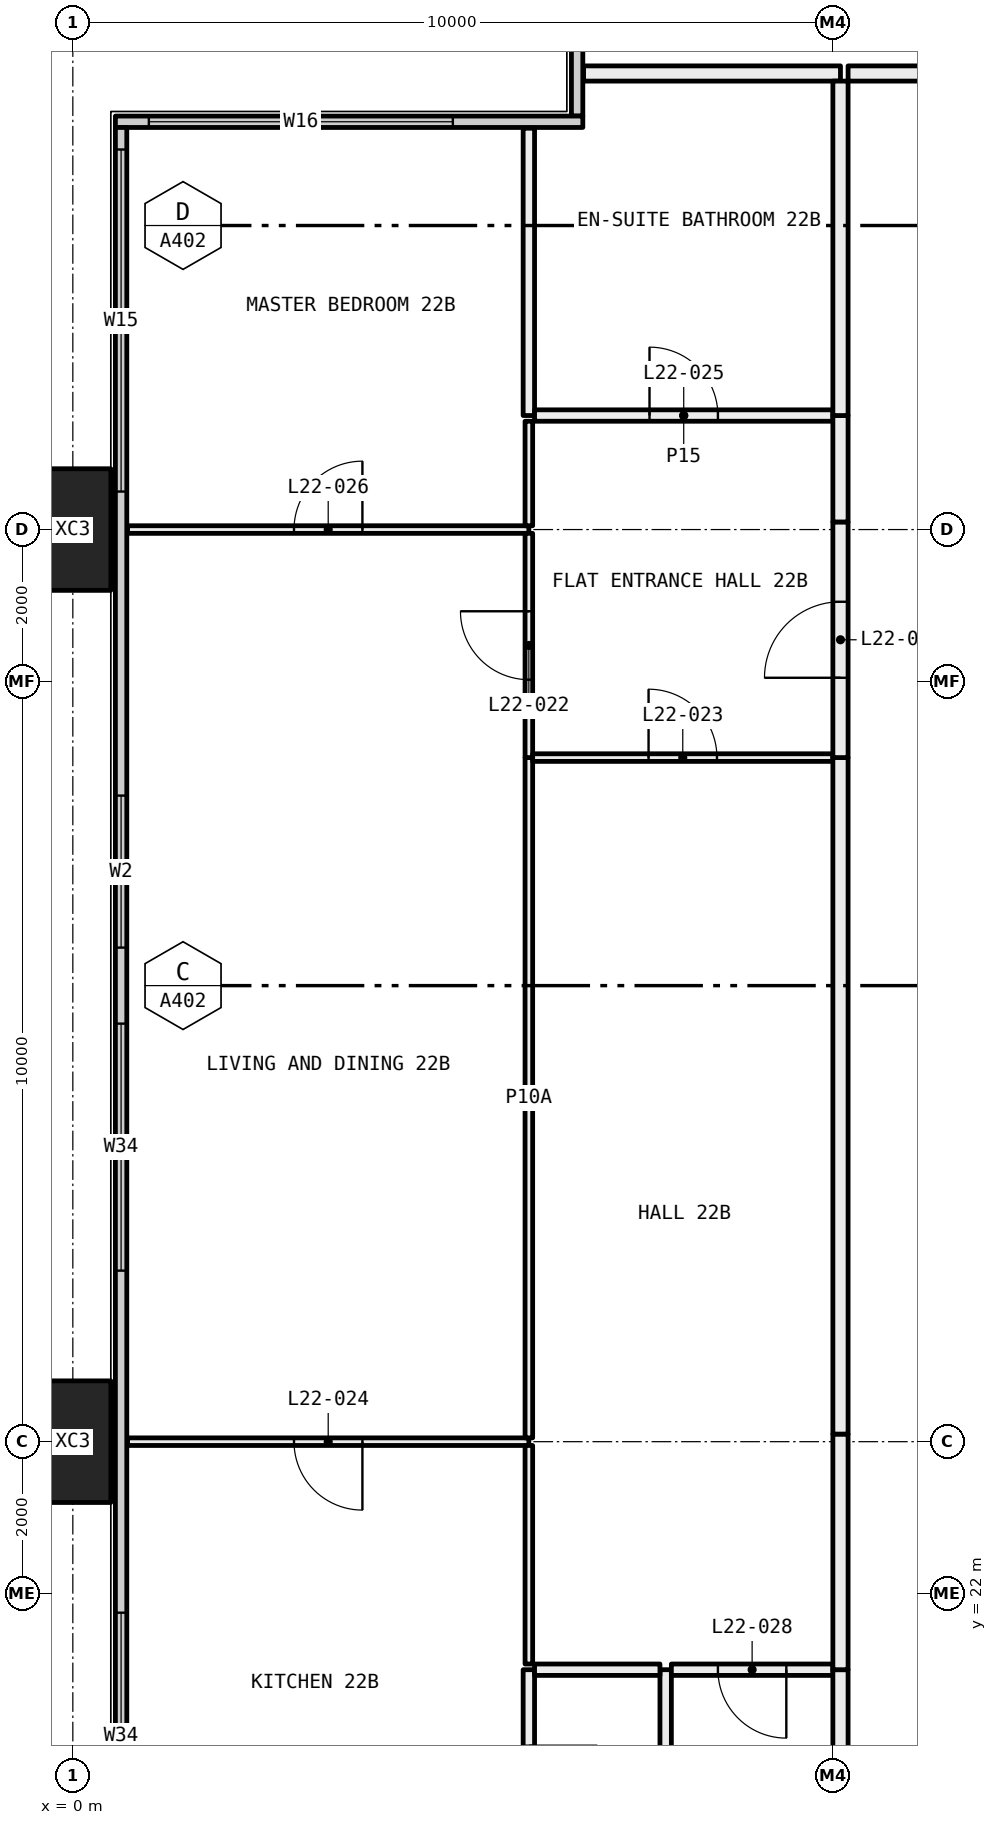
"""IFC4 building model, lengths in metres.
Left out: names, types, materials, properties, quantities, classifications, styles, units other than length and angle.
Written with IfcOpenShell. Run it as: python <this file> out.ifc"""

import sys

from ifc_helpers import new_model, si_unit, direction, frame, frame_2d, origin, origin_2d, place, context, subcontext, project, spatial, rectangle, hollow_rectangle, extrude, element, fill, save


model = new_model("IFC4")
c1 = context("Model", 3, precision=1e-05, world=origin(), true_north=direction((0.0, 1.0)))
c2 = subcontext(c1, "Body", "Model", "MODEL_VIEW")
j1 = project(units=[si_unit("LENGTHUNIT", "METRE"), si_unit("PLANEANGLEUNIT", "RADIAN")], contexts=[c1])
p1 = place(None, origin())
s1 = spatial("IfcSite", under=j1, at=p1, CompositionType="ELEMENT")
p2 = place(p1, origin())
s2 = spatial("IfcBuilding", under=s1, at=p2, CompositionType="ELEMENT")
p3 = place(p2, frame((0.0, 0.0, 88.65)))
s3 = spatial("IfcBuildingStorey", under=s2, at=p3, CompositionType="ELEMENT", Elevation=88.65)
for number, where, z_axis, x_axis in (
    (1, (0.0, 24.0, -0.4), (0.0, 0.0, 1.0), (0.0, 1.0, 0.0)),
    (2, (0.0, 36.0, -0.4), (0.0, 0.0, 1.0), (0.0, 1.0, 0.0)),
):
    element("IfcColumn", number, at=place(p3, frame(where, z_axis=z_axis, x_axis=x_axis)), inside=s3, PredefinedType="COLUMN", context=c2, shape_type="SweptSolid", body=[
        extrude(hollow_rectangle(XDim=1.6, YDim=1.0, WallThickness=0.065, at=origin_2d()), origin(), (0.0, 0.0, 1.0), 3.45),
    ])
p4 = place(p3, frame((6.635, 41.44, 0.0), z_axis=(0.0, 0.0, 1.0), x_axis=(0.0, 1.0, 0.0)))
e3 = element("IfcWall", 3, at=p4, inside=s3, PredefinedType="ELEMENTEDWALL", context=c2, shape_type="SweptSolid", body=[
    extrude(rectangle(XDim=5.85, YDim=0.15, at=frame_2d((2.925, 0.0))), origin(), (0.0, 0.0, 1.0), 3.05),
])
p5 = place(p4, frame((1.56, 0.0, 0.45)))
e4 = element("IfcOpeningElement", 4, at=p5, cuts=e3, PredefinedType="OPENING", context=c2, shape_type="SweptSolid", body=[
    extrude(rectangle(XDim=4.0, YDim=2.55, at=frame_2d((2.0, 1.275))), frame((0.0, 0.085, 0.0), z_axis=(0.0, -1.0, 0.0), x_axis=(1.0, 0.0, 0.0)), (0.0, 0.0, 1.0), 0.17),
])
p6 = place(p3, frame((0.56, 41.365, 0.0), z_axis=(0.0, 0.0, 1.0), x_axis=(1.0, 0.0, 0.0)))
e5 = element("IfcWall", 5, at=p6, inside=s3, PredefinedType="ELEMENTEDWALL", context=c2, shape_type="SweptSolid", body=[
    extrude(rectangle(XDim=6.15, YDim=0.15, at=frame_2d((3.075, 0.0))), origin(), (0.0, 0.0, 1.0), 3.05),
])
p7 = place(p6, frame((0.44, 0.0, 0.45)))
e6 = element("IfcOpeningElement", 6, at=p7, cuts=e5, PredefinedType="OPENING", context=c2, shape_type="SweptSolid", body=[
    extrude(rectangle(XDim=4.0, YDim=2.55, at=frame_2d((2.0, 1.275))), frame((0.0, 0.085, 0.0), z_axis=(0.0, -1.0, 0.0), x_axis=(1.0, 0.0, 0.0)), (0.0, 0.0, 1.0), 0.17),
])
p8 = place(p3, frame((0.635, 6.71, 0.0), z_axis=(0.0, 0.0, 1.0), x_axis=(0.0, 1.0, 0.0)))
e7 = element("IfcWall", 7, at=p8, inside=s3, PredefinedType="ELEMENTEDWALL", context=c2, shape_type="SweptSolid", body=[
    extrude(rectangle(XDim=34.58, YDim=0.15, at=frame_2d((17.29, 0.0))), origin(), (0.0, 0.0, 1.0), 3.05),
])
p9 = place(p8, frame((0.29, 0.0, 0.45)))
e8 = element("IfcOpeningElement", 8, at=p9, cuts=e7, PredefinedType="OPENING", context=c2, shape_type="SweptSolid", body=[
    extrude(rectangle(XDim=4.5, YDim=2.55, at=frame_2d((2.25, 1.275))), frame((0.0, 0.085, 0.0), z_axis=(0.0, -1.0, 0.0), x_axis=(1.0, 0.0, 0.0)), (0.0, 0.0, 1.0), 0.17),
])
p10 = place(p8, frame((7.54, 0.0, 0.45)))
e9 = element("IfcOpeningElement", 9, at=p10, cuts=e7, PredefinedType="OPENING", context=c2, shape_type="SweptSolid", body=[
    extrude(rectangle(XDim=3.25, YDim=2.55, at=frame_2d((1.625, 1.275))), frame((0.0, 0.085, 0.0), z_axis=(0.0, -1.0, 0.0), x_axis=(1.0, 0.0, 0.0)), (0.0, 0.0, 1.0), 0.17),
])
p11 = place(p8, frame((11.79, 0.0, 0.45)))
e10 = element("IfcOpeningElement", 10, at=p11, cuts=e7, PredefinedType="OPENING", context=c2, shape_type="SweptSolid", body=[
    extrude(rectangle(XDim=3.25, YDim=2.55, at=frame_2d((1.625, 1.275))), frame((0.0, 0.085, 0.0), z_axis=(0.0, -1.0, 0.0), x_axis=(1.0, 0.0, 0.0)), (0.0, 0.0, 1.0), 0.17),
])
p12 = place(p8, frame((19.54, 0.0, 0.45)))
e11 = element("IfcOpeningElement", 11, at=p12, cuts=e7, PredefinedType="OPENING", context=c2, shape_type="SweptSolid", body=[
    extrude(rectangle(XDim=3.25, YDim=2.55, at=frame_2d((1.625, 1.275))), frame((0.0, 0.085, 0.0), z_axis=(0.0, -1.0, 0.0), x_axis=(1.0, 0.0, 0.0)), (0.0, 0.0, 1.0), 0.17),
])
p13 = place(p8, frame((23.79, 0.0, 0.45)))
e12 = element("IfcOpeningElement", 12, at=p13, cuts=e7, PredefinedType="OPENING", context=c2, shape_type="SweptSolid", body=[
    extrude(rectangle(XDim=2.0, YDim=2.55, at=frame_2d((1.0, 1.275))), frame((0.0, 0.085, 0.0), z_axis=(0.0, -1.0, 0.0), x_axis=(1.0, 0.0, 0.0)), (0.0, 0.0, 1.0), 0.17),
])
p14 = place(p8, frame((29.79, 0.0, 0.45)))
e13 = element("IfcOpeningElement", 13, at=p14, cuts=e7, PredefinedType="OPENING", context=c2, shape_type="SweptSolid", body=[
    extrude(rectangle(XDim=4.5, YDim=2.55, at=frame_2d((2.25, 1.275))), frame((0.0, 0.085, 0.0), z_axis=(0.0, -1.0, 0.0), x_axis=(1.0, 0.0, 0.0)), (0.0, 0.0, 1.0), 0.17),
])
p15 = place(p3, frame((6.0, 24.0, 0.0), z_axis=(0.0, 0.0, 1.0), x_axis=(-1.0, 0.0, 0.0)))
e14 = element("IfcWall", 14, at=p15, inside=s3, PredefinedType="PARTITIONING", context=c2, shape_type="SweptSolid", body=[
    extrude(rectangle(XDim=5.28, YDim=0.1, at=frame_2d((2.64, 0.0))), origin(), (0.0, 0.0, 1.0), 2.45),
])
p16 = place(p15, frame((2.19, 0.0, 0.0)))
e15 = element("IfcOpeningElement", 15, at=p16, cuts=e14, PredefinedType="OPENING", context=c2, shape_type="SweptSolid", body=[
    extrude(rectangle(XDim=0.9, YDim=2.1, at=frame_2d((0.45, 1.05))), frame((0.0, 0.06, 0.0), z_axis=(0.0, -1.0, 0.0), x_axis=(1.0, 0.0, 0.0)), (0.0, 0.0, 1.0), 0.12),
])
p17 = place(p3, frame((6.0, 18.1, 0.0), z_axis=(0.0, 0.0, 1.0), x_axis=(0.0, 1.0, 0.0)))
e16 = element("IfcWall", 16, at=p17, inside=s3, PredefinedType="PARTITIONING", context=c2, shape_type="SweptSolid", body=[
    extrude(rectangle(XDim=2.9, YDim=0.15, at=frame_2d((1.45, 0.0))), origin(), (0.0, 0.0, 1.0), 3.05),
])
p18 = place(p17, frame((1.0, 0.0, 0.0)))
e17 = element("IfcOpeningElement", 17, at=p18, cuts=e16, PredefinedType="OPENING", context=c2, shape_type="SweptSolid", body=[
    extrude(rectangle(XDim=0.9, YDim=2.1, at=frame_2d((0.45, 1.05))), frame((0.0, 0.085, 0.0), z_axis=(0.0, -1.0, 0.0), x_axis=(1.0, 0.0, 0.0)), (0.0, 0.0, 1.0), 0.17),
])
p19 = place(p3, frame((6.0, 21.075, 0.0), z_axis=(0.0, 0.0, 1.0), x_axis=(0.0, 1.0, 0.0)))
e18 = element("IfcWall", 18, at=p19, inside=s3, PredefinedType="PARTITIONING", context=c2, shape_type="SweptSolid", body=[
    extrude(rectangle(XDim=2.875, YDim=0.1, at=frame_2d((1.438, 0.0))), origin(), (0.0, 0.0, 1.0), 2.45),
])
p20 = place(p3, frame((6.0, 36.0, 0.0), z_axis=(0.0, 0.0, 1.0), x_axis=(-1.0, 0.0, 0.0)))
e19 = element("IfcWall", 19, at=p20, inside=s3, PredefinedType="PARTITIONING", context=c2, shape_type="SweptSolid", body=[
    extrude(rectangle(XDim=5.28, YDim=0.1, at=frame_2d((2.64, 0.0))), origin(), (0.0, 0.0, 1.0), 2.45),
])
p21 = place(p20, frame((2.19, 0.0, 0.0)))
e20 = element("IfcOpeningElement", 20, at=p21, cuts=e19, PredefinedType="OPENING", context=c2, shape_type="SweptSolid", body=[
    extrude(rectangle(XDim=0.9, YDim=2.1, at=frame_2d((0.45, 1.05))), frame((0.0, 0.06, 0.0), z_axis=(0.0, -1.0, 0.0), x_axis=(1.0, 0.0, 0.0)), (0.0, 0.0, 1.0), 0.12),
])
p22 = place(p3, frame((6.0, 24.05, 0.0), z_axis=(0.0, 0.0, 1.0), x_axis=(0.0, 1.0, 0.0)))
e21 = element("IfcWall", 21, at=p22, inside=s3, PredefinedType="PARTITIONING", context=c2, shape_type="SweptSolid", body=[
    extrude(rectangle(XDim=8.95, YDim=0.1, at=frame_2d((4.475, 0.0))), origin(), (0.0, 0.0, 1.0), 2.45),
])
p23 = place(p3, frame((6.0, 33.0, 0.0), z_axis=(0.0, 0.0, 1.0), x_axis=(0.0, 1.0, 0.0)))
e22 = element("IfcWall", 22, at=p23, inside=s3, PredefinedType="PARTITIONING", context=c2, shape_type="SweptSolid", body=[
    extrude(rectangle(XDim=2.95, YDim=0.1, at=frame_2d((1.475, 0.0))), origin(), (0.0, 0.0, 1.0), 2.45),
])
p24 = place(p23, frame((1.025, 0.0, 0.0)))
e23 = element("IfcOpeningElement", 23, at=p24, cuts=e22, PredefinedType="OPENING", context=c2, shape_type="SweptSolid", body=[
    extrude(rectangle(XDim=0.9, YDim=2.1, at=frame_2d((0.45, 1.05))), frame((0.0, 0.06, 0.0), z_axis=(0.0, -1.0, 0.0), x_axis=(1.0, 0.0, 0.0)), (0.0, 0.0, 1.0), 0.12),
])
p25 = place(p3, frame((6.0, 36.05, 0.0), z_axis=(0.0, 0.0, 1.0), x_axis=(0.0, 1.0, 0.0)))
e24 = element("IfcWall", 24, at=p25, inside=s3, PredefinedType="PARTITIONING", context=c2, shape_type="SweptSolid", body=[
    extrude(rectangle(XDim=1.375, YDim=0.1, at=frame_2d((0.688, 0.0))), origin(), (0.0, 0.0, 1.0), 2.45),
])
p26 = place(p3, frame((6.0, 37.5, 0.0), z_axis=(0.0, 0.0, 1.0), x_axis=(0.0, 1.0, 0.0)))
e25 = element("IfcWall", 25, at=p26, inside=s3, PredefinedType="PARTITIONING", context=c2, shape_type="SweptSolid", body=[
    extrude(rectangle(XDim=3.78, YDim=0.15, at=frame_2d((1.89, 0.0))), origin(), (0.0, 0.0, 1.0), 3.05),
])
p27 = place(p3, frame((7.8, 18.1, 0.0), z_axis=(0.0, 0.0, 1.0), x_axis=(0.0, 1.0, 0.0)))
e26 = element("IfcWall", 26, at=p27, inside=s3, PredefinedType="PARTITIONING", context=c2, shape_type="SweptSolid", body=[
    extrude(rectangle(XDim=2.9, YDim=0.15, at=frame_2d((1.45, 0.0))), origin(), (0.0, 0.0, 1.0), 3.05),
])
p28 = place(p3, frame((7.725, 21.0, 0.0), z_axis=(0.0, 0.0, 1.0), x_axis=(-1.0, 0.0, 0.0)))
e27 = element("IfcWall", 27, at=p28, inside=s3, PredefinedType="PARTITIONING", context=c2, shape_type="SweptSolid", body=[
    extrude(rectangle(XDim=1.65, YDim=0.15, at=frame_2d((0.825, 0.0))), origin(), (0.0, 0.0, 1.0), 3.05),
])
p29 = place(p3, frame((10.0, 21.0, 0.0), z_axis=(0.0, 0.0, 1.0), x_axis=(-1.0, 0.0, 0.0)))
e28 = element("IfcWall", 28, at=p29, inside=s3, PredefinedType="PARTITIONING", context=c2, shape_type="SweptSolid", body=[
    extrude(rectangle(XDim=2.125, YDim=0.15, at=frame_2d((1.062, 0.0))), origin(), (0.0, 0.0, 1.0), 3.05),
])
p30 = place(p29, frame((0.613, 0.0, 0.0)))
e29 = element("IfcOpeningElement", 29, at=p30, cuts=e28, PredefinedType="OPENING", context=c2, shape_type="SweptSolid", body=[
    extrude(rectangle(XDim=0.9, YDim=2.1, at=frame_2d((0.45, 1.05))), frame((0.0, 0.085, 0.0), z_axis=(0.0, -1.0, 0.0), x_axis=(1.0, 0.0, 0.0)), (0.0, 0.0, 1.0), 0.17),
])
p31 = place(p3, frame((10.1, 18.1, 0.0), z_axis=(0.0, 0.0, 1.0), x_axis=(0.0, 1.0, 0.0)))
e30 = element("IfcWall", 30, at=p31, inside=s3, PredefinedType="PARTITIONING", context=c2, shape_type="SweptSolid", body=[
    extrude(rectangle(XDim=2.9, YDim=0.2, at=frame_2d((1.45, 0.0))), origin(), (0.0, 0.0, 1.0), 3.05),
])
p32 = place(p3, frame((10.0, 33.0, 0.0), z_axis=(0.0, 0.0, 1.0), x_axis=(-1.0, 0.0, 0.0)))
e31 = element("IfcWall", 31, at=p32, inside=s3, PredefinedType="PARTITIONING", context=c2, shape_type="SweptSolid", body=[
    extrude(rectangle(XDim=3.95, YDim=0.1, at=frame_2d((1.975, 0.0))), origin(), (0.0, 0.0, 1.0), 3.05),
])
p33 = place(p32, frame((1.525, 0.0, 0.0)))
e32 = element("IfcOpeningElement", 32, at=p33, cuts=e31, PredefinedType="OPENING", context=c2, shape_type="SweptSolid", body=[
    extrude(rectangle(XDim=0.9, YDim=2.1, at=frame_2d((0.45, 1.05))), frame((0.0, 0.06, 0.0), z_axis=(0.0, -1.0, 0.0), x_axis=(1.0, 0.0, 0.0)), (0.0, 0.0, 1.0), 0.12),
])
p34 = place(p3, frame((10.1, 21.0, 0.0), z_axis=(0.0, 0.0, 1.0), x_axis=(0.0, 1.0, 0.0)))
e33 = element("IfcWall", 33, at=p34, inside=s3, PredefinedType="PARTITIONING", context=c2, shape_type="SweptSolid", body=[
    extrude(rectangle(XDim=3.1, YDim=0.2, at=frame_2d((1.55, 0.0))), origin(), (0.0, 0.0, 1.0), 2.45),
])
p35 = place(p3, frame((10.1, 24.1, 0.0), z_axis=(0.0, 0.0, 1.0), x_axis=(0.0, 1.0, 0.0)))
e34 = element("IfcWall", 34, at=p35, inside=s3, PredefinedType="PARTITIONING", context=c2, shape_type="SweptSolid", body=[
    extrude(rectangle(XDim=8.9, YDim=0.2, at=frame_2d((4.45, 0.0))), origin(), (0.0, 0.0, 1.0), 3.05),
])
p36 = place(p3, frame((10.0, 37.5, 0.0), z_axis=(0.0, 0.0, 1.0), x_axis=(-1.0, 0.0, 0.0)))
e35 = element("IfcWall", 35, at=p36, inside=s3, PredefinedType="PARTITIONING", context=c2, shape_type="SweptSolid", body=[
    extrude(rectangle(XDim=3.925, YDim=0.15, at=frame_2d((1.962, 0.0))), origin(), (0.0, 0.0, 1.0), 3.05),
])
p37 = place(p36, frame((1.512, 0.0, 0.0)))
e36 = element("IfcOpeningElement", 36, at=p37, cuts=e35, PredefinedType="OPENING", context=c2, shape_type="SweptSolid", body=[
    extrude(rectangle(XDim=0.9, YDim=2.1, at=frame_2d((0.45, 1.05))), frame((0.0, 0.085, 0.0), z_axis=(0.0, -1.0, 0.0), x_axis=(1.0, 0.0, 0.0)), (0.0, 0.0, 1.0), 0.17),
])
p38 = place(p3, frame((10.1, 33.0, 0.0), z_axis=(0.0, 0.0, 1.0), x_axis=(0.0, 1.0, 0.0)))
e37 = element("IfcWall", 37, at=p38, inside=s3, PredefinedType="PARTITIONING", context=c2, shape_type="SweptSolid", body=[
    extrude(rectangle(XDim=3.1, YDim=0.2, at=frame_2d((1.55, 0.0))), origin(), (0.0, 0.0, 1.0), 2.45),
])
p39 = place(p38, frame((1.05, 0.0, 0.0)))
e38 = element("IfcOpeningElement", 38, at=p39, cuts=e37, PredefinedType="OPENING", context=c2, shape_type="SweptSolid", body=[
    extrude(rectangle(XDim=1.0, YDim=2.1, at=frame_2d((0.5, 1.05))), frame((0.0, 0.11, 0.0), z_axis=(0.0, -1.0, 0.0), x_axis=(1.0, 0.0, 0.0)), (0.0, 0.0, 1.0), 0.22),
])
p40 = place(p3, frame((10.1, 36.1, 0.0), z_axis=(0.0, 0.0, 1.0), x_axis=(0.0, 1.0, 0.0)))
e39 = element("IfcWall", 39, at=p40, inside=s3, PredefinedType="PARTITIONING", context=c2, shape_type="SweptSolid", body=[
    extrude(rectangle(XDim=1.4, YDim=0.2, at=frame_2d((0.7, 0.0))), origin(), (0.0, 0.0, 1.0), 3.05),
])
p41 = place(p3, frame((10.1, 42.0, 0.0), z_axis=(0.0, 0.0, 1.0), x_axis=(-1.0, 0.0, 0.0)))
e40 = element("IfcWall", 40, at=p41, inside=s3, PredefinedType="PARTITIONING", context=c2, shape_type="SweptSolid", body=[
    extrude(rectangle(XDim=3.38, YDim=0.2, at=frame_2d((1.69, 0.0))), origin(), (0.0, 0.0, 1.0), 3.05),
])
p42 = place(p3, frame((10.1, 37.5, 0.0), z_axis=(0.0, 0.0, 1.0), x_axis=(0.0, 1.0, 0.0)))
e41 = element("IfcWall", 41, at=p42, inside=s3, PredefinedType="PARTITIONING", context=c2, shape_type="SweptSolid", body=[
    extrude(rectangle(XDim=4.4, YDim=0.2, at=frame_2d((2.2, 0.0))), origin(), (0.0, 0.0, 1.0), 3.05),
])
p43 = place(p3, frame((10.2, 42.0, 0.0), z_axis=(0.0, 0.0, 1.0), x_axis=(1.0, 0.0, 0.0)))
e42 = element("IfcWall", 42, at=p43, inside=s3, PredefinedType="PARTITIONING", context=c2, shape_type="SweptSolid", body=[
    extrude(rectangle(XDim=1.8, YDim=0.2, at=frame_2d((0.9, 0.0))), origin(), (0.0, 0.0, 1.0), 3.05),
])
p44 = place(p7, origin())
e43 = element("IfcWindow", 43, at=p44, inside=s3, PartitioningType="SINGLE_PANEL", PredefinedType="WINDOW", context=c2, shape_type="SweptSolid", body=[
    extrude(rectangle(XDim=4.0, YDim=2.55, at=frame_2d((2.0, 1.275))), frame((0.0, 0.03, 0.0), z_axis=(0.0, -1.0, 0.0), x_axis=(1.0, 0.0, 0.0)), (0.0, 0.0, 1.0), 0.06),
])
fill(e6, e43)
p45 = place(p11, origin())
e44 = element("IfcWindow", 44, at=p45, inside=s3, PartitioningType="SINGLE_PANEL", PredefinedType="WINDOW", context=c2, shape_type="SweptSolid", body=[
    extrude(rectangle(XDim=3.25, YDim=2.55, at=frame_2d((1.625, 1.275))), frame((0.0, 0.03, 0.0), z_axis=(0.0, -1.0, 0.0), x_axis=(1.0, 0.0, 0.0)), (0.0, 0.0, 1.0), 0.06),
])
fill(e10, e44)
p46 = place(p12, origin())
e45 = element("IfcWindow", 45, at=p46, inside=s3, PartitioningType="SINGLE_PANEL", PredefinedType="WINDOW", context=c2, shape_type="SweptSolid", body=[
    extrude(rectangle(XDim=3.25, YDim=2.55, at=frame_2d((1.625, 1.275))), frame((0.0, 0.03, 0.0), z_axis=(0.0, -1.0, 0.0), x_axis=(1.0, 0.0, 0.0)), (0.0, 0.0, 1.0), 0.06),
])
fill(e11, e45)
p47 = place(p13, origin())
e46 = element("IfcWindow", 46, at=p47, inside=s3, PartitioningType="SINGLE_PANEL", PredefinedType="WINDOW", context=c2, shape_type="SweptSolid", body=[
    extrude(rectangle(XDim=2.0, YDim=2.55, at=frame_2d((1.0, 1.275))), frame((0.0, 0.03, 0.0), z_axis=(0.0, -1.0, 0.0), x_axis=(1.0, 0.0, 0.0)), (0.0, 0.0, 1.0), 0.06),
])
fill(e12, e46)
p48 = place(p14, origin())
e47 = element("IfcWindow", 47, at=p48, inside=s3, PartitioningType="SINGLE_PANEL", PredefinedType="WINDOW", context=c2, shape_type="SweptSolid", body=[
    extrude(rectangle(XDim=4.5, YDim=2.55, at=frame_2d((2.25, 1.275))), frame((0.0, 0.03, 0.0), z_axis=(0.0, -1.0, 0.0), x_axis=(1.0, 0.0, 0.0)), (0.0, 0.0, 1.0), 0.06),
])
fill(e13, e47)
p49 = place(p39, origin())
e48 = element("IfcDoor", 48, at=p49, inside=s3, OperationType="SINGLE_SWING_RIGHT", PredefinedType="DOOR", context=c2, shape_type="SweptSolid", body=[
    extrude(rectangle(XDim=1.0, YDim=2.1, at=frame_2d((0.5, 1.05))), frame((0.0, 0.025, 0.0), z_axis=(0.0, -1.0, 0.0), x_axis=(1.0, 0.0, 0.0)), (0.0, 0.0, 1.0), 0.05),
])
fill(e38, e48)
p50 = place(p24, origin())
e49 = element("IfcDoor", 49, at=p50, inside=s3, OperationType="SINGLE_SWING_LEFT", PredefinedType="DOOR", context=c2, shape_type="SweptSolid", body=[
    extrude(rectangle(XDim=0.9, YDim=2.1, at=frame_2d((0.45, 1.05))), frame((0.0, 0.025, 0.0), z_axis=(0.0, -1.0, 0.0), x_axis=(1.0, 0.0, 0.0)), (0.0, 0.0, 1.0), 0.05),
])
fill(e23, e49)
p51 = place(p33, frame((0.9, 0.0, 0.0), x_axis=(-1.0, 0.0, 0.0)))
e50 = element("IfcDoor", 50, at=p51, inside=s3, OperationType="SINGLE_SWING_RIGHT", PredefinedType="DOOR", context=c2, shape_type="SweptSolid", body=[
    extrude(rectangle(XDim=0.9, YDim=2.1, at=frame_2d((0.45, 1.05))), frame((0.0, 0.025, 0.0), z_axis=(0.0, -1.0, 0.0), x_axis=(1.0, 0.0, 0.0)), (0.0, 0.0, 1.0), 0.05),
])
fill(e32, e50)
p52 = place(p16, origin())
e51 = element("IfcDoor", 51, at=p52, inside=s3, OperationType="SINGLE_SWING_RIGHT", PredefinedType="DOOR", context=c2, shape_type="SweptSolid", body=[
    extrude(rectangle(XDim=0.9, YDim=2.1, at=frame_2d((0.45, 1.05))), frame((0.0, 0.025, 0.0), z_axis=(0.0, -1.0, 0.0), x_axis=(1.0, 0.0, 0.0)), (0.0, 0.0, 1.0), 0.05),
])
fill(e15, e51)
p53 = place(p37, frame((0.9, 0.0, 0.0), x_axis=(-1.0, 0.0, 0.0)))
e52 = element("IfcDoor", 52, at=p53, inside=s3, OperationType="SINGLE_SWING_RIGHT", PredefinedType="DOOR", context=c2, shape_type="SweptSolid", body=[
    extrude(rectangle(XDim=0.9, YDim=2.1, at=frame_2d((0.45, 1.05))), frame((0.0, 0.025, 0.0), z_axis=(0.0, -1.0, 0.0), x_axis=(1.0, 0.0, 0.0)), (0.0, 0.0, 1.0), 0.05),
])
fill(e36, e52)
p54 = place(p21, frame((0.9, 0.0, 0.0), x_axis=(-1.0, 0.0, 0.0)))
e53 = element("IfcDoor", 53, at=p54, inside=s3, OperationType="SINGLE_SWING_LEFT", PredefinedType="DOOR", context=c2, shape_type="SweptSolid", body=[
    extrude(rectangle(XDim=0.9, YDim=2.1, at=frame_2d((0.45, 1.05))), frame((0.0, 0.025, 0.0), z_axis=(0.0, -1.0, 0.0), x_axis=(1.0, 0.0, 0.0)), (0.0, 0.0, 1.0), 0.05),
])
fill(e20, e53)
p55 = place(p30, origin())
e54 = element("IfcDoor", 54, at=p55, inside=s3, OperationType="SINGLE_SWING_RIGHT", PredefinedType="DOOR", context=c2, shape_type="SweptSolid", body=[
    extrude(rectangle(XDim=0.9, YDim=2.1, at=frame_2d((0.45, 1.05))), frame((0.0, 0.025, 0.0), z_axis=(0.0, -1.0, 0.0), x_axis=(1.0, 0.0, 0.0)), (0.0, 0.0, 1.0), 0.05),
])
fill(e29, e54)
save(model, sys.argv[1])
